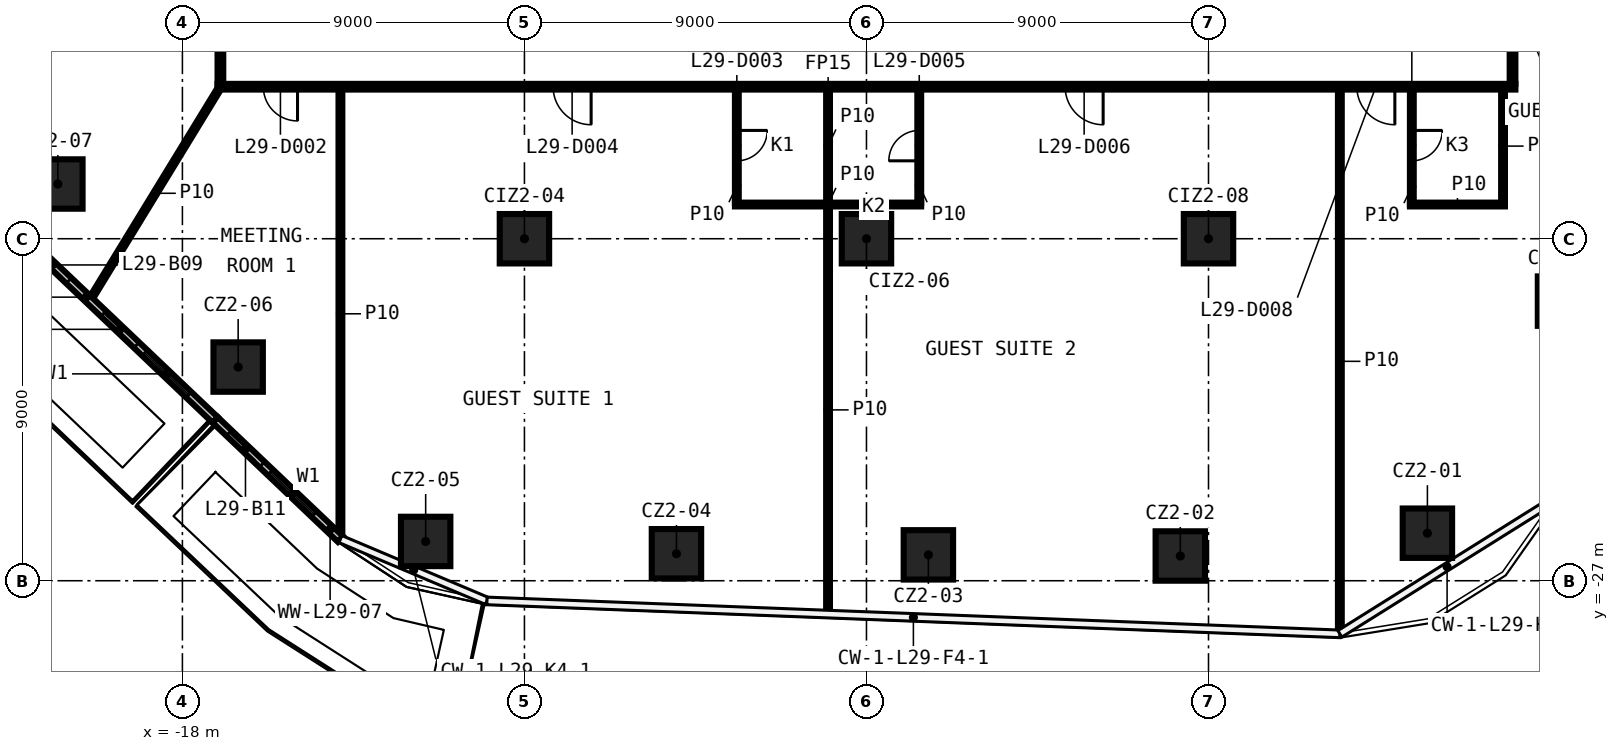
"""IFC4 building model, lengths in metres.
Left out: names, types, materials, properties, quantities, classifications, styles, units other than length and angle.
Written with IfcOpenShell. Run it as: python <this file> out.ifc"""

import sys

from ifc_helpers import new_model, si_unit, direction, frame, frame_2d, origin, origin_2d, place, context, subcontext, project, spatial, rectangle, extrude, element, fill, save


model = new_model("IFC4")
c1 = context("Model", 3, precision=1e-05, world=origin(), true_north=direction((0.0, 1.0)))
c2 = subcontext(c1, "Body", "Model", "MODEL_VIEW")
j1 = project(units=[si_unit("LENGTHUNIT", "METRE"), si_unit("PLANEANGLEUNIT", "RADIAN")], contexts=[c1])
p1 = place(None, origin())
s1 = spatial("IfcSite", under=j1, at=p1, CompositionType="ELEMENT")
p2 = place(p1, origin())
s2 = spatial("IfcBuilding", under=s1, at=p2, CompositionType="ELEMENT")
p3 = place(p2, frame((0.0, 0.0, 132.2)))
s3 = spatial("IfcBuildingStorey", under=s2, at=p3, CompositionType="ELEMENT", Elevation=132.2)
for number, where, z_axis, x_axis in (
    (1, (14.76, -25.749, 0.0), (0.0, 0.0, 1.0), (1.0, 0.0, 0.0)),
    (2, (8.258, -26.349, 0.0), (0.0, 0.0, 1.0), (1.0, 0.0, 0.0)),
    (3, (1.629, -26.319, 0.0), (0.0, 0.0, 1.0), (1.0, 0.0, 0.0)),
    (4, (-5.0, -26.29, 0.0), (0.0, 0.0, 1.0), (1.0, 0.0, 0.0)),
    (5, (-11.599, -25.966, 0.0), (0.0, 0.0, 1.0), (1.0, 0.0, 0.0)),
    (6, (-16.533, -21.377, 0.0), (0.0, 0.0, 1.0), (1.0, 0.0, 0.0)),
    (7, (-21.277, -16.56, 0.0), (0.0, 0.0, 1.0), (1.0, 0.0, 0.0)),
    (8, (18.315, -19.642, 0.0), (0.0, 0.0, 1.0), (1.0, 0.0, 0.0)),
    (9, (-9.0, -18.0, 0.0), (0.0, 0.0, 1.0), (1.0, 0.0, 0.0)),
    (10, (0.0, -18.0, 0.0), (0.0, 0.0, 1.0), (1.0, 0.0, 0.0)),
    (11, (9.0, -18.0, 0.0), (0.0, 0.0, 1.0), (1.0, 0.0, 0.0)),
):
    element("IfcColumn", number, at=place(p3, frame(where, z_axis=z_axis, x_axis=x_axis)), inside=s3, PredefinedType="COLUMN", context=c2, shape_type="SweptSolid", body=[
        extrude(rectangle(XDim=1.3, YDim=1.3, at=origin_2d()), origin(), (0.0, 0.0, 1.0), 3.3),
    ])
p4 = place(p3, frame((-3.461, -17.1, 0.0), z_axis=(0.0, 0.0, 1.0), x_axis=(1.0, 0.0, 0.0)))
e12 = element("IfcWall", 12, at=p4, inside=s3, PredefinedType="PARTITIONING", context=c2, shape_type="SweptSolid", body=[
    extrude(rectangle(XDim=4.9, YDim=0.1, at=frame_2d((2.45, 0.0))), origin(), (0.0, 0.0, 1.0), 3.3),
])
p5 = place(p3, frame((14.3, -17.1, 0.0), z_axis=(0.0, 0.0, 1.0), x_axis=(1.0, 0.0, 0.0)))
e13 = element("IfcWall", 13, at=p5, inside=s3, PredefinedType="PARTITIONING", context=c2, shape_type="SweptSolid", body=[
    extrude(rectangle(XDim=2.5, YDim=0.1, at=frame_2d((1.25, 0.0))), origin(), (0.0, 0.0, 1.0), 3.3),
])
p6 = place(p3, frame((17.075, -14.0, 0.0), z_axis=(0.0, 0.0, 1.0), x_axis=(-1.0, 0.0, 0.0)))
e14 = element("IfcWall", 14, at=p6, inside=s3, PredefinedType="PARTITIONING", context=c2, shape_type="SweptSolid", body=[
    extrude(rectangle(XDim=34.15, YDim=0.15, at=frame_2d((17.075, 0.0))), origin(), (0.0, 0.0, 1.0), 3.3),
])
p7 = place(p6, frame((32.046, 0.0, 0.0)))
e15 = element("IfcOpeningElement", 15, at=p7, cuts=e14, PredefinedType="OPENING", context=c2, shape_type="SweptSolid", body=[
    extrude(rectangle(XDim=0.9, YDim=2.1, at=frame_2d((0.45, 1.05))), frame((0.0, 0.085, 0.0), z_axis=(0.0, -1.0, 0.0), x_axis=(1.0, 0.0, 0.0)), (0.0, 0.0, 1.0), 0.17),
])
p8 = place(p6, frame((24.32, 0.0, 0.0)))
e16 = element("IfcOpeningElement", 16, at=p8, cuts=e14, PredefinedType="OPENING", context=c2, shape_type="SweptSolid", body=[
    extrude(rectangle(XDim=1.0, YDim=2.1, at=frame_2d((0.5, 1.05))), frame((0.0, 0.085, 0.0), z_axis=(0.0, -1.0, 0.0), x_axis=(1.0, 0.0, 0.0)), (0.0, 0.0, 1.0), 0.17),
])
p9 = place(p6, frame((10.847, 0.0, 0.0)))
e17 = element("IfcOpeningElement", 17, at=p9, cuts=e14, PredefinedType="OPENING", context=c2, shape_type="SweptSolid", body=[
    extrude(rectangle(XDim=1.0, YDim=2.1, at=frame_2d((0.5, 1.05))), frame((0.0, 0.085, 0.0), z_axis=(0.0, -1.0, 0.0), x_axis=(1.0, 0.0, 0.0)), (0.0, 0.0, 1.0), 0.17),
])
p10 = place(p6, frame((3.172, 0.0, 0.0)))
e18 = element("IfcOpeningElement", 18, at=p10, cuts=e14, PredefinedType="OPENING", context=c2, shape_type="SweptSolid", body=[
    extrude(rectangle(XDim=1.0, YDim=2.1, at=frame_2d((0.5, 1.05))), frame((0.0, 0.085, 0.0), z_axis=(0.0, -1.0, 0.0), x_axis=(1.0, 0.0, 0.0)), (0.0, 0.0, 1.0), 0.17),
])
p11 = place(p3, frame((-20.429, -19.608, 0.0), z_axis=(0.0, 0.0, 1.0), x_axis=(0.521610739124, 0.853183589171, 0.0)))
e19 = element("IfcWall", 19, at=p11, inside=s3, PredefinedType="PARTITIONING", context=c2, shape_type="SweptSolid", body=[
    extrude(rectangle(XDim=6.574, YDim=0.1, at=frame_2d((3.287, 0.0))), origin(), (0.0, 0.0, 1.0), 3.3),
])
p12 = place(p3, frame((17.0, 13.925, 0.0), z_axis=(0.0, 0.0, 1.0), x_axis=(0.0, -1.0, 0.0)))
e20 = element("IfcWall", 20, at=p12, inside=s3, PredefinedType="PARTITIONING", context=c2, shape_type="SweptSolid", body=[
    extrude(rectangle(XDim=27.85, YDim=0.15, at=frame_2d((13.925, 0.0))), origin(), (0.0, 0.0, 1.0), 3.3),
])
p13 = place(p12, frame((24.983, 0.0, 0.0)))
e21 = element("IfcOpeningElement", 21, at=p13, cuts=e20, PredefinedType="OPENING", context=c2, shape_type="SweptSolid", body=[
    extrude(rectangle(XDim=0.9, YDim=2.1, at=frame_2d((0.45, 1.05))), frame((0.0, 0.085, 0.0), z_axis=(0.0, -1.0, 0.0), x_axis=(1.0, 0.0, 0.0)), (0.0, 0.0, 1.0), 0.17),
])
p14 = place(p12, frame((20.143, 0.0, 0.0)))
e22 = element("IfcOpeningElement", 22, at=p14, cuts=e20, PredefinedType="OPENING", context=c2, shape_type="SweptSolid", body=[
    extrude(rectangle(XDim=0.9, YDim=2.1, at=frame_2d((0.45, 1.05))), frame((0.0, 0.085, 0.0), z_axis=(0.0, -1.0, 0.0), x_axis=(1.0, 0.0, 0.0)), (0.0, 0.0, 1.0), 0.17),
])
p15 = place(p12, frame((11.054, 0.0, 0.0)))
e23 = element("IfcOpeningElement", 23, at=p15, cuts=e20, PredefinedType="OPENING", context=c2, shape_type="SweptSolid", body=[
    extrude(rectangle(XDim=1.0, YDim=2.1, at=frame_2d((0.5, 1.05))), frame((0.0, 0.085, 0.0), z_axis=(0.0, -1.0, 0.0), x_axis=(1.0, 0.0, 0.0)), (0.0, 0.0, 1.0), 0.17),
])
p16 = place(p12, frame((7.139, 0.0, 0.0)))
e24 = element("IfcOpeningElement", 24, at=p16, cuts=e20, PredefinedType="OPENING", context=c2, shape_type="SweptSolid", body=[
    extrude(rectangle(XDim=0.9, YDim=2.1, at=frame_2d((0.45, 1.05))), frame((0.0, 0.085, 0.0), z_axis=(0.0, -1.0, 0.0), x_axis=(1.0, 0.0, 0.0)), (0.0, 0.0, 1.0), 0.17),
])
p17 = place(p3, frame((16.75, -17.05, 0.0), z_axis=(0.0, 0.0, 1.0), x_axis=(0.0, 1.0, 0.0)))
e25 = element("IfcWall", 25, at=p17, inside=s3, PredefinedType="PARTITIONING", context=c2, shape_type="SweptSolid", body=[
    extrude(rectangle(XDim=2.975, YDim=0.1, at=frame_2d((1.488, 0.0))), origin(), (0.0, 0.0, 1.0), 3.3),
])
p18 = place(p3, frame((14.35, -14.075, 0.0), z_axis=(0.0, 0.0, 1.0), x_axis=(0.0, -1.0, 0.0)))
e26 = element("IfcWall", 26, at=p18, inside=s3, PredefinedType="PARTITIONING", context=c2, shape_type="SweptSolid", body=[
    extrude(rectangle(XDim=3.025, YDim=0.1, at=frame_2d((1.513, 0.0))), origin(), (0.0, 0.0, 1.0), 3.3),
])
p19 = place(p18, frame((1.075, 0.0, 0.0)))
e27 = element("IfcOpeningElement", 27, at=p19, cuts=e26, PredefinedType="OPENING", context=c2, shape_type="SweptSolid", body=[
    extrude(rectangle(XDim=0.8, YDim=2.1, at=frame_2d((0.4, 1.05))), frame((0.0, 0.06, 0.0), z_axis=(0.0, -1.0, 0.0), x_axis=(1.0, 0.0, 0.0)), (0.0, 0.0, 1.0), 0.12),
])
p20 = place(p3, frame((12.456, -28.378, 0.0), z_axis=(0.0, 0.0, 1.0), x_axis=(0.0, 1.0, 0.0)))
e28 = element("IfcWall", 28, at=p20, inside=s3, PredefinedType="PARTITIONING", context=c2, shape_type="SweptSolid", body=[
    extrude(rectangle(XDim=14.303, YDim=0.1, at=frame_2d((7.151, 0.0))), origin(), (0.0, 0.0, 1.0), 3.3),
])
p21 = place(p3, frame((1.389, -17.05, 0.0), z_axis=(0.0, 0.0, 1.0), x_axis=(0.0, 1.0, 0.0)))
e29 = element("IfcWall", 29, at=p21, inside=s3, PredefinedType="PARTITIONING", context=c2, shape_type="SweptSolid", body=[
    extrude(rectangle(XDim=2.975, YDim=0.1, at=frame_2d((1.488, 0.0))), origin(), (0.0, 0.0, 1.0), 3.3),
])
p22 = place(p21, frame((1.1, 0.0, 0.0)))
e30 = element("IfcOpeningElement", 30, at=p22, cuts=e29, PredefinedType="OPENING", context=c2, shape_type="SweptSolid", body=[
    extrude(rectangle(XDim=0.8, YDim=2.1, at=frame_2d((0.4, 1.05))), frame((0.0, 0.06, 0.0), z_axis=(0.0, -1.0, 0.0), x_axis=(1.0, 0.0, 0.0)), (0.0, 0.0, 1.0), 0.12),
])
p23 = place(p3, frame((-1.011, -27.858, 0.0), z_axis=(0.0, 0.0, 1.0), x_axis=(0.0, 1.0, 0.0)))
e31 = element("IfcWall", 31, at=p23, inside=s3, PredefinedType="PARTITIONING", context=c2, shape_type="SweptSolid", body=[
    extrude(rectangle(XDim=10.708, YDim=0.1, at=frame_2d((5.354, 0.0))), origin(), (0.0, 0.0, 1.0), 3.3),
])
p24 = place(p3, frame((-1.011, -17.05, 0.0), z_axis=(0.0, 0.0, 1.0), x_axis=(0.0, 1.0, 0.0)))
e32 = element("IfcWall", 32, at=p24, inside=s3, PredefinedType="PARTITIONING", context=c2, shape_type="SweptSolid", body=[
    extrude(rectangle(XDim=2.975, YDim=0.1, at=frame_2d((1.488, 0.0))), origin(), (0.0, 0.0, 1.0), 3.3),
])
p25 = place(p3, frame((-3.411, -14.075, 0.0), z_axis=(0.0, 0.0, 1.0), x_axis=(0.0, -1.0, 0.0)))
e33 = element("IfcWall", 33, at=p25, inside=s3, PredefinedType="PARTITIONING", context=c2, shape_type="SweptSolid", body=[
    extrude(rectangle(XDim=2.975, YDim=0.1, at=frame_2d((1.488, 0.0))), origin(), (0.0, 0.0, 1.0), 3.3),
])
p26 = place(p25, frame((1.075, 0.0, 0.0)))
e34 = element("IfcOpeningElement", 34, at=p26, cuts=e33, PredefinedType="OPENING", context=c2, shape_type="SweptSolid", body=[
    extrude(rectangle(XDim=0.8, YDim=2.1, at=frame_2d((0.4, 1.05))), frame((0.0, 0.06, 0.0), z_axis=(0.0, -1.0, 0.0), x_axis=(1.0, 0.0, 0.0)), (0.0, 0.0, 1.0), 0.12),
])
p27 = place(p3, frame((-13.842, -25.876, 0.0), z_axis=(0.0, 0.0, 1.0), x_axis=(0.0, 1.0, 0.0)))
e35 = element("IfcWall", 35, at=p27, inside=s3, PredefinedType="PARTITIONING", context=c2, shape_type="SweptSolid", body=[
    extrude(rectangle(XDim=11.801, YDim=0.1, at=frame_2d((5.9, 0.0))), origin(), (0.0, 0.0, 1.0), 3.3),
])
p28 = place(p3, frame((-17.0, -13.925, 0.0), z_axis=(0.0, 0.0, 1.0), x_axis=(0.0, 1.0, 0.0)))
e36 = element("IfcWall", 36, at=p28, inside=s3, PredefinedType="PARTITIONING", context=c2, shape_type="SweptSolid", body=[
    extrude(rectangle(XDim=27.85, YDim=0.15, at=frame_2d((13.925, 0.0))), origin(), (0.0, 0.0, 1.0), 3.3),
])
p29 = place(p28, frame((11.107, 0.0, 0.0)))
e37 = element("IfcOpeningElement", 37, at=p29, cuts=e36, PredefinedType="OPENING", context=c2, shape_type="SweptSolid", body=[
    extrude(rectangle(XDim=0.9, YDim=2.1, at=frame_2d((0.45, 1.05))), frame((0.0, 0.085, 0.0), z_axis=(0.0, -1.0, 0.0), x_axis=(1.0, 0.0, 0.0)), (0.0, 0.0, 1.0), 0.17),
])
p30 = place(p28, frame((25.204, 0.0, 0.0)))
e38 = element("IfcOpeningElement", 38, at=p30, cuts=e36, PredefinedType="OPENING", context=c2, shape_type="SweptSolid", body=[
    extrude(rectangle(XDim=0.9, YDim=2.1, at=frame_2d((0.45, 1.05))), frame((0.0, 0.085, 0.0), z_axis=(0.0, -1.0, 0.0), x_axis=(1.0, 0.0, 0.0)), (0.0, 0.0, 1.0), 0.17),
])
p31 = place(p28, frame((18.833, 0.0, 0.0)))
e39 = element("IfcOpeningElement", 39, at=p31, cuts=e36, PredefinedType="OPENING", context=c2, shape_type="SweptSolid", body=[
    extrude(rectangle(XDim=1.0, YDim=2.1, at=frame_2d((0.5, 1.05))), frame((0.0, 0.085, 0.0), z_axis=(0.0, -1.0, 0.0), x_axis=(1.0, 0.0, 0.0)), (0.0, 0.0, 1.0), 0.17),
])
p32 = place(p28, frame((17.31, 0.0, 0.0)))
e40 = element("IfcOpeningElement", 40, at=p32, cuts=e36, PredefinedType="OPENING", context=c2, shape_type="SweptSolid", body=[
    extrude(rectangle(XDim=1.0, YDim=2.1, at=frame_2d((0.5, 1.05))), frame((0.0, 0.085, 0.0), z_axis=(0.0, -1.0, 0.0), x_axis=(1.0, 0.0, 0.0)), (0.0, 0.0, 1.0), 0.17),
])
p33 = place(p3, frame((-23.741, -16.484, 0.0), z_axis=(0.0, 0.0, 1.0), x_axis=(0.724483683082, -0.689291950445, 0.0)))
e41 = element("IfcWall", 41, at=p33, inside=s3, PredefinedType="SOLIDWALL", context=c2, shape_type="SweptSolid", body=[
    extrude(rectangle(XDim=9.116, YDim=0.2, at=frame_2d((4.558, 0.0))), origin(), (0.0, 0.0, 1.0), 3.3),
])
p34 = place(p33, frame((0.5, 0.0, 0.6)))
e42 = element("IfcOpeningElement", 42, at=p34, cuts=e41, PredefinedType="OPENING", context=c2, shape_type="SweptSolid", body=[
    extrude(rectangle(XDim=1.6, YDim=2.4, at=frame_2d((0.8, 1.2))), frame((0.0, 0.11, 0.0), z_axis=(0.0, -1.0, 0.0), x_axis=(1.0, 0.0, 0.0)), (0.0, 0.0, 1.0), 0.22),
])
p35 = place(p33, frame((2.6, 0.0, 0.0)))
e43 = element("IfcOpeningElement", 43, at=p35, cuts=e41, PredefinedType="OPENING", context=c2, shape_type="SweptSolid", body=[
    extrude(rectangle(XDim=1.2, YDim=2.4, at=frame_2d((0.6, 1.2))), frame((0.0, 0.11, 0.0), z_axis=(0.0, -1.0, 0.0), x_axis=(1.0, 0.0, 0.0)), (0.0, 0.0, 1.0), 0.22),
])
p36 = place(p33, frame((6.558, 0.0, 0.6)))
e44 = element("IfcOpeningElement", 44, at=p36, cuts=e41, PredefinedType="OPENING", context=c2, shape_type="SweptSolid", body=[
    extrude(rectangle(XDim=1.6, YDim=2.4, at=frame_2d((0.8, 1.2))), frame((0.0, 0.11, 0.0), z_axis=(0.0, -1.0, 0.0), x_axis=(1.0, 0.0, 0.0)), (0.0, 0.0, 1.0), 0.22),
])
p37 = place(p33, frame((5.058, 0.0, 0.0)))
e45 = element("IfcOpeningElement", 45, at=p37, cuts=e41, PredefinedType="OPENING", context=c2, shape_type="SweptSolid", body=[
    extrude(rectangle(XDim=1.2, YDim=2.4, at=frame_2d((0.6, 1.2))), frame((0.0, 0.11, 0.0), z_axis=(0.0, -1.0, 0.0), x_axis=(1.0, 0.0, 0.0)), (0.0, 0.0, 1.0), 0.22),
])
p38 = place(p3, frame((-17.137, -22.768, 0.0), z_axis=(0.0, 0.0, 1.0), x_axis=(0.724465880686, -0.689310661257, 0.0)))
e46 = element("IfcWall", 46, at=p38, inside=s3, PredefinedType="SOLIDWALL", context=c2, shape_type="SweptSolid", body=[
    extrude(rectangle(XDim=4.549, YDim=0.2, at=frame_2d((2.274, 0.0))), origin(), (0.0, 0.0, 1.0), 3.3),
])
p39 = place(p38, frame((2.0, 0.0, 0.6)))
e47 = element("IfcOpeningElement", 47, at=p39, cuts=e46, PredefinedType="OPENING", context=c2, shape_type="SweptSolid", body=[
    extrude(rectangle(XDim=1.6, YDim=2.4, at=frame_2d((0.8, 1.2))), frame((0.0, 0.11, 0.0), z_axis=(0.0, -1.0, 0.0), x_axis=(1.0, 0.0, 0.0)), (0.0, 0.0, 1.0), 0.22),
])
p40 = place(p38, frame((0.5, 0.0, 0.0)))
e48 = element("IfcOpeningElement", 48, at=p40, cuts=e46, PredefinedType="OPENING", context=c2, shape_type="SweptSolid", body=[
    extrude(rectangle(XDim=1.2, YDim=2.4, at=frame_2d((0.6, 1.2))), frame((0.0, 0.11, 0.0), z_axis=(0.0, -1.0, 0.0), x_axis=(1.0, 0.0, 0.0)), (0.0, 0.0, 1.0), 0.22),
])
p41 = place(p7, origin())
e49 = element("IfcDoor", 49, at=p41, inside=s3, OperationType="SINGLE_SWING_RIGHT", PredefinedType="DOOR", context=c2, shape_type="SweptSolid", body=[
    extrude(rectangle(XDim=0.9, YDim=2.1, at=frame_2d((0.45, 1.05))), frame((0.0, 0.025, 0.0), z_axis=(0.0, -1.0, 0.0), x_axis=(1.0, 0.0, 0.0)), (0.0, 0.0, 1.0), 0.05),
])
fill(e15, e49)
p42 = place(p26, origin())
e50 = element("IfcDoor", 50, at=p42, inside=s3, OperationType="SINGLE_SWING_RIGHT", PredefinedType="DOOR", context=c2, shape_type="SweptSolid", body=[
    extrude(rectangle(XDim=0.8, YDim=2.1, at=frame_2d((0.4, 1.05))), frame((0.0, 0.025, 0.0), z_axis=(0.0, -1.0, 0.0), x_axis=(1.0, 0.0, 0.0)), (0.0, 0.0, 1.0), 0.05),
])
fill(e34, e50)
p43 = place(p8, origin())
e51 = element("IfcDoor", 51, at=p43, inside=s3, OperationType="SINGLE_SWING_LEFT", PredefinedType="DOOR", context=c2, shape_type="SweptSolid", body=[
    extrude(rectangle(XDim=1.0, YDim=2.1, at=frame_2d((0.5, 1.05))), frame((0.0, 0.025, 0.0), z_axis=(0.0, -1.0, 0.0), x_axis=(1.0, 0.0, 0.0)), (0.0, 0.0, 1.0), 0.05),
])
fill(e16, e51)
p44 = place(p22, origin())
e52 = element("IfcDoor", 52, at=p44, inside=s3, OperationType="SINGLE_SWING_LEFT", PredefinedType="DOOR", context=c2, shape_type="SweptSolid", body=[
    extrude(rectangle(XDim=0.8, YDim=2.1, at=frame_2d((0.4, 1.05))), frame((0.0, 0.025, 0.0), z_axis=(0.0, -1.0, 0.0), x_axis=(1.0, 0.0, 0.0)), (0.0, 0.0, 1.0), 0.05),
])
fill(e30, e52)
p45 = place(p9, origin())
e53 = element("IfcDoor", 53, at=p45, inside=s3, OperationType="SINGLE_SWING_RIGHT", PredefinedType="DOOR", context=c2, shape_type="SweptSolid", body=[
    extrude(rectangle(XDim=1.0, YDim=2.1, at=frame_2d((0.5, 1.05))), frame((0.0, 0.025, 0.0), z_axis=(0.0, -1.0, 0.0), x_axis=(1.0, 0.0, 0.0)), (0.0, 0.0, 1.0), 0.05),
])
fill(e17, e53)
p46 = place(p19, origin())
e54 = element("IfcDoor", 54, at=p46, inside=s3, OperationType="SINGLE_SWING_RIGHT", PredefinedType="DOOR", context=c2, shape_type="SweptSolid", body=[
    extrude(rectangle(XDim=0.8, YDim=2.1, at=frame_2d((0.4, 1.05))), frame((0.0, 0.025, 0.0), z_axis=(0.0, -1.0, 0.0), x_axis=(1.0, 0.0, 0.0)), (0.0, 0.0, 1.0), 0.05),
])
fill(e27, e54)
p47 = place(p10, origin())
e55 = element("IfcDoor", 55, at=p47, inside=s3, OperationType="SINGLE_SWING_LEFT", PredefinedType="DOOR", context=c2, shape_type="SweptSolid", body=[
    extrude(rectangle(XDim=1.0, YDim=2.1, at=frame_2d((0.5, 1.05))), frame((0.0, 0.025, 0.0), z_axis=(0.0, -1.0, 0.0), x_axis=(1.0, 0.0, 0.0)), (0.0, 0.0, 1.0), 0.05),
])
fill(e18, e55)
p48 = place(p35, origin())
e56 = element("IfcDoor", 56, at=p48, inside=s3, OperationType="SLIDING_TO_LEFT", PredefinedType="DOOR", context=c2, shape_type="SweptSolid", body=[
    extrude(rectangle(XDim=1.2, YDim=2.4, at=frame_2d((0.6, 1.2))), frame((0.0, 0.025, 0.0), z_axis=(0.0, -1.0, 0.0), x_axis=(1.0, 0.0, 0.0)), (0.0, 0.0, 1.0), 0.05),
])
fill(e43, e56)
p49 = place(p36, origin())
e57 = element("IfcWindow", 57, at=p49, inside=s3, PartitioningType="SINGLE_PANEL", PredefinedType="WINDOW", context=c2, shape_type="SweptSolid", body=[
    extrude(rectangle(XDim=1.6, YDim=2.4, at=frame_2d((0.8, 1.2))), frame((0.0, 0.03, 0.0), z_axis=(0.0, -1.0, 0.0), x_axis=(1.0, 0.0, 0.0)), (0.0, 0.0, 1.0), 0.06),
])
fill(e44, e57)
p50 = place(p37, origin())
e58 = element("IfcDoor", 58, at=p50, inside=s3, OperationType="SLIDING_TO_LEFT", PredefinedType="DOOR", context=c2, shape_type="SweptSolid", body=[
    extrude(rectangle(XDim=1.2, YDim=2.4, at=frame_2d((0.6, 1.2))), frame((0.0, 0.025, 0.0), z_axis=(0.0, -1.0, 0.0), x_axis=(1.0, 0.0, 0.0)), (0.0, 0.0, 1.0), 0.05),
])
fill(e45, e58)
p51 = place(p39, origin())
e59 = element("IfcWindow", 59, at=p51, inside=s3, PartitioningType="SINGLE_PANEL", PredefinedType="WINDOW", context=c2, shape_type="SweptSolid", body=[
    extrude(rectangle(XDim=1.6, YDim=2.4, at=frame_2d((0.8, 1.2))), frame((0.0, 0.03, 0.0), z_axis=(0.0, -1.0, 0.0), x_axis=(1.0, 0.0, 0.0)), (0.0, 0.0, 1.0), 0.06),
])
fill(e47, e59)
p52 = place(p40, origin())
e60 = element("IfcDoor", 60, at=p52, inside=s3, OperationType="SLIDING_TO_LEFT", PredefinedType="DOOR", context=c2, shape_type="SweptSolid", body=[
    extrude(rectangle(XDim=1.2, YDim=2.4, at=frame_2d((0.6, 1.2))), frame((0.0, 0.025, 0.0), z_axis=(0.0, -1.0, 0.0), x_axis=(1.0, 0.0, 0.0)), (0.0, 0.0, 1.0), 0.05),
])
fill(e48, e60)
save(model, sys.argv[1])
